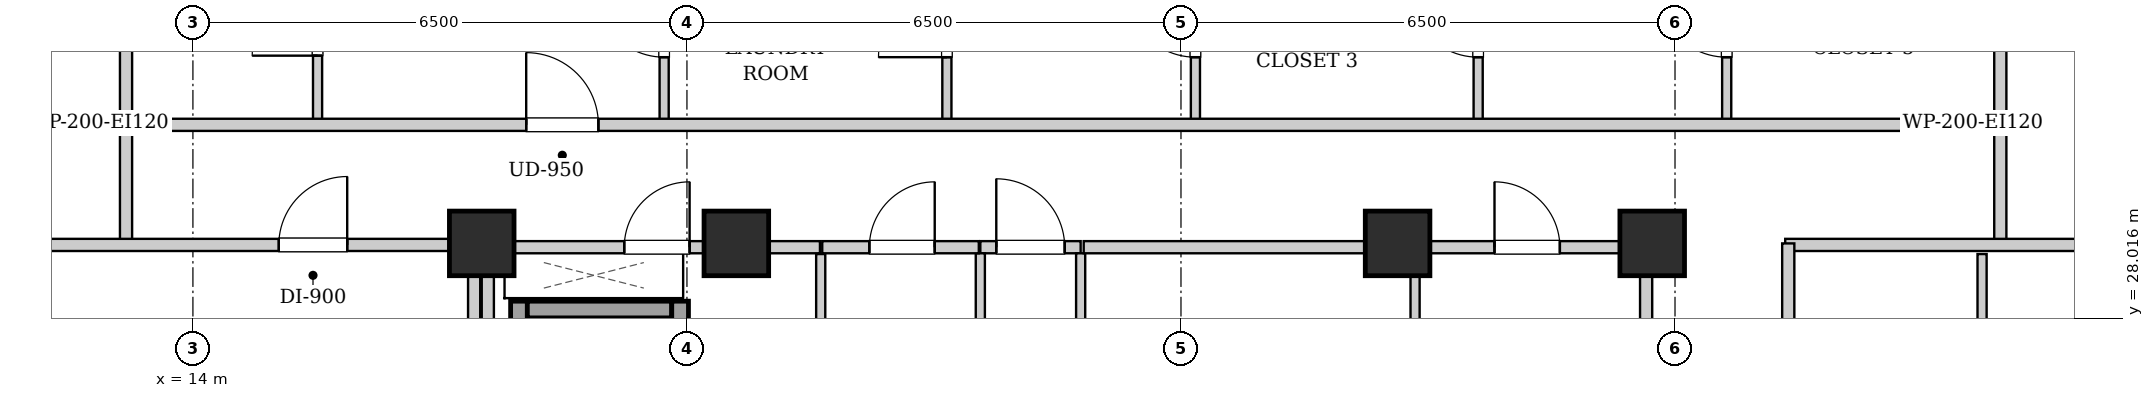
"""IFC4 building model, lengths in metres.
Left out: names, types, materials, properties, quantities, classifications, styles, units other than length and angle.
Written with IfcOpenShell. Run it as: python <this file> out.ifc"""

import sys

from ifc_helpers import new_model, si_unit, direction, frame, frame_2d, origin, origin_2d, place, context, subcontext, project, spatial, rectangle, extrude, element, fill, save


model = new_model("IFC4")
c1 = context("Model", 3, precision=1e-05, world=origin(), true_north=direction((0.0, 1.0)))
c2 = subcontext(c1, "Body", "Model", "MODEL_VIEW")
j1 = project(units=[si_unit("LENGTHUNIT", "METRE"), si_unit("PLANEANGLEUNIT", "RADIAN")], contexts=[c1])
p1 = place(None, origin())
s1 = spatial("IfcSite", under=j1, at=p1, CompositionType="ELEMENT")
p2 = place(p1, origin())
s2 = spatial("IfcBuilding", under=s1, at=p2, CompositionType="ELEMENT")
p3 = place(p2, frame((0.0, 0.0, 184.3)))
s3 = spatial("IfcBuildingStorey", under=s2, at=p3, CompositionType="ELEMENT", Elevation=184.3)
for number, where, z_axis, x_axis in (
    (1, (17.8, 29.0, 0.0), (0.0, 0.0, 1.0), (1.0, 0.0, 0.0)),
    (2, (21.15, 29.0, 0.0), (0.0, 0.0, 1.0), (1.0, 0.0, 0.0)),
    (3, (29.85, 29.0, 0.0), (0.0, 0.0, 1.0), (1.0, 0.0, 0.0)),
    (4, (33.2, 29.0, 0.0), (0.0, 0.0, 1.0), (1.0, 0.0, 0.0)),
):
    element("IfcColumn", number, at=place(p3, frame(where, z_axis=z_axis, x_axis=x_axis)), inside=s3, PredefinedType="COLUMN", context=c2, shape_type="SweptSolid", body=[
        extrude(rectangle(XDim=0.85, YDim=0.85, at=origin_2d()), origin(), (0.0, 0.0, 1.0), 3.3),
    ])
p4 = place(p3, frame((18.29, 24.1, 0.0), z_axis=(0.0, 0.0, 1.0), x_axis=(0.0, 1.0, 0.0)))
e5 = element("IfcWall", 5, at=p4, inside=s3, PredefinedType="SHEAR", context=c2, shape_type="SweptSolid", body=[
    extrude(rectangle(XDim=4.14, YDim=0.22, at=frame_2d((2.07, 0.0))), origin(), (0.0, 0.0, 1.0), 3.04),
])
p5 = place(p3, frame((18.4, 28.13, 0.0), z_axis=(0.0, 0.0, 1.0), x_axis=(1.0, 0.0, 0.0)))
e6 = element("IfcWall", 6, at=p5, inside=s3, PredefinedType="SHEAR", context=c2, shape_type="SweptSolid", body=[
    extrude(rectangle(XDim=1.9, YDim=0.22, at=frame_2d((0.95, 0.0))), origin(), (0.0, 0.0, 1.0), 3.04),
])
p6 = place(p3, frame((20.41, 26.06, 0.0), z_axis=(0.0, 0.0, 1.0), x_axis=(0.0, 1.0, 0.0)))
e7 = element("IfcWall", 7, at=p6, inside=s3, PredefinedType="SHEAR", context=c2, shape_type="SweptSolid", body=[
    extrude(rectangle(XDim=2.18, YDim=0.22, at=frame_2d((1.09, 0.0))), origin(), (0.0, 0.0, 1.0), 3.04),
])
p7 = place(p6, frame((0.54, 0.0, 0.0)))
e8 = element("IfcOpeningElement", 8, at=p7, cuts=e7, PredefinedType="OPENING", context=c2, shape_type="SweptSolid", body=[
    extrude(rectangle(XDim=1.1, YDim=2.15, at=frame_2d((0.55, 1.075))), frame((0.0, 0.12, 0.0), z_axis=(0.0, -1.0, 0.0), x_axis=(1.0, 0.0, 0.0)), (0.0, 0.0, 1.0), 0.24),
])
for number, where, z_axis, x_axis in (
    (9, (17.88, 24.12, 0.0), (0.0, 0.0, 1.0), (0.0, 1.0, 0.0)),
    (10, (33.12, 24.12, 0.0), (0.0, 0.0, 1.0), (0.0, 1.0, 0.0)),
):
    element("IfcWall", number, at=place(p3, frame(where, z_axis=z_axis, x_axis=x_axis)), inside=s3, PredefinedType="PARTITIONING", context=c2, shape_type="SweptSolid", body=[
        extrude(rectangle(XDim=4.76, YDim=0.16, at=frame_2d((2.38, 0.0))), origin(), (0.0, 0.0, 1.0), 3.04),
    ])
p8 = place(p3, frame((24.36, 28.95, 0.0), z_axis=(0.0, 0.0, 1.0), x_axis=(1.0, 0.0, 0.0)))
e11 = element("IfcWall", 11, at=p8, inside=s3, PredefinedType="PARTITIONING", context=c2, shape_type="SweptSolid", body=[
    extrude(rectangle(XDim=1.32, YDim=0.16, at=frame_2d((0.66, 0.0))), origin(), (0.0, 0.0, 1.0), 2.556),
])
p9 = place(p8, frame((0.21, 0.0, 0.0)))
e12 = element("IfcOpeningElement", 12, at=p9, cuts=e11, PredefinedType="OPENING", context=c2, shape_type="SweptSolid", body=[
    extrude(rectangle(XDim=0.9, YDim=2.05, at=frame_2d((0.45, 1.025))), frame((0.0, 0.09, 0.0), z_axis=(0.0, -1.0, 0.0), x_axis=(1.0, 0.0, 0.0)), (0.0, 0.0, 1.0), 0.18),
])
p10 = place(p3, frame((17.96, 28.95, 0.0), z_axis=(0.0, 0.0, 1.0), x_axis=(1.0, 0.0, 0.0)))
e13 = element("IfcWall", 13, at=p10, inside=s3, PredefinedType="PARTITIONING", context=c2, shape_type="SweptSolid", body=[
    extrude(rectangle(XDim=4.29, YDim=0.16, at=frame_2d((2.145, 0.0))), origin(), (0.0, 0.0, 1.0), 2.556),
])
p11 = place(p10, frame((1.715, 0.0, 0.0)))
e14 = element("IfcOpeningElement", 14, at=p11, cuts=e13, PredefinedType="OPENING", context=c2, shape_type="SweptSolid", body=[
    extrude(rectangle(XDim=0.86, YDim=2.05, at=frame_2d((0.43, 1.025))), frame((0.0, 0.09, 0.0), z_axis=(0.0, -1.0, 0.0), x_axis=(1.0, 0.0, 0.0)), (0.0, 0.0, 1.0), 0.18),
])
for number, where, z_axis, x_axis in (
    (15, (24.36, 25.0, 0.0), (0.0, 0.0, 1.0), (0.0, 1.0, 0.0)),
    (16, (25.68, 25.0, 0.0), (0.0, 0.0, 1.0), (0.0, 1.0, 0.0)),
):
    element("IfcWall", number, at=place(p3, frame(where, z_axis=z_axis, x_axis=x_axis)), inside=s3, PredefinedType="PARTITIONING", context=c2, shape_type="SweptSolid", body=[
        extrude(rectangle(XDim=3.87, YDim=0.12, at=frame_2d((1.935, 0.0))), origin(), (0.0, 0.0, 1.0), 3.04),
    ])
p12 = place(p3, frame((30.08, 26.18, 0.0), z_axis=(0.0, 0.0, 1.0), x_axis=(0.0, 1.0, 0.0)))
e17 = element("IfcWall", 17, at=p12, inside=s3, PredefinedType="PARTITIONING", context=c2, shape_type="SweptSolid", body=[
    extrude(rectangle(XDim=2.68, YDim=0.12, at=frame_2d((1.34, 0.0))), origin(), (0.0, 0.0, 1.0), 3.04),
])
p13 = place(p3, frame((30.08, 28.95, 0.0), z_axis=(0.0, 0.0, 1.0), x_axis=(1.0, 0.0, 0.0)))
e18 = element("IfcWall", 18, at=p13, inside=s3, PredefinedType="PARTITIONING", context=c2, shape_type="SweptSolid", body=[
    extrude(rectangle(XDim=2.96, YDim=0.16, at=frame_2d((1.48, 0.0))), origin(), (0.0, 0.0, 1.0), 3.04),
])
p14 = place(p13, frame((1.045, 0.0, 0.0)))
e19 = element("IfcOpeningElement", 19, at=p14, cuts=e18, PredefinedType="OPENING", context=c2, shape_type="SweptSolid", body=[
    extrude(rectangle(XDim=0.86, YDim=2.05, at=frame_2d((0.43, 1.025))), frame((0.0, 0.09, 0.0), z_axis=(0.0, -1.0, 0.0), x_axis=(1.0, 0.0, 0.0)), (0.0, 0.0, 1.0), 0.18),
])
p15 = place(p3, frame((22.26, 25.0, 0.0), z_axis=(0.0, 0.0, 1.0), x_axis=(0.0, 1.0, 0.0)))
e20 = element("IfcWall", 20, at=p15, inside=s3, PredefinedType="PARTITIONING", context=c2, shape_type="SweptSolid", body=[
    extrude(rectangle(XDim=3.86, YDim=0.12, at=frame_2d((1.93, 0.0))), origin(), (0.0, 0.0, 1.0), 3.04),
])
p16 = place(p3, frame((22.28, 28.95, 0.0), z_axis=(0.0, 0.0, 1.0), x_axis=(1.0, 0.0, 0.0)))
e21 = element("IfcWall", 21, at=p16, inside=s3, PredefinedType="PARTITIONING", context=c2, shape_type="SweptSolid", body=[
    extrude(rectangle(XDim=2.06, YDim=0.16, at=frame_2d((1.03, 0.0))), origin(), (0.0, 0.0, 1.0), 2.556),
])
p17 = place(p16, frame((0.62, 0.0, 0.0)))
e22 = element("IfcOpeningElement", 22, at=p17, cuts=e21, PredefinedType="OPENING", context=c2, shape_type="SweptSolid", body=[
    extrude(rectangle(XDim=0.86, YDim=2.05, at=frame_2d((0.43, 1.025))), frame((0.0, 0.09, 0.0), z_axis=(0.0, -1.0, 0.0), x_axis=(1.0, 0.0, 0.0)), (0.0, 0.0, 1.0), 0.18),
])
p18 = place(p3, frame((25.72, 28.95, 0.0), z_axis=(0.0, 0.0, 1.0), x_axis=(1.0, 0.0, 0.0)))
e23 = element("IfcWall", 23, at=p18, inside=s3, PredefinedType="PARTITIONING", context=c2, shape_type="SweptSolid", body=[
    extrude(rectangle(XDim=4.32, YDim=0.16, at=frame_2d((2.16, 0.0))), origin(), (0.0, 0.0, 1.0), 2.556),
])
for number, where, z_axis, x_axis in (
    (24, (13.12, 28.98, 0.0), (0.0, 0.0, 1.0), (0.0, 1.0, 0.0)),
    (25, (37.78, 28.98, 0.0), (0.0, 0.0, 1.0), (0.0, 1.0, 0.0)),
):
    element("IfcWall", number, at=place(p3, frame(where, z_axis=z_axis, x_axis=x_axis)), inside=s3, PredefinedType="PARTITIONING", context=c2, shape_type="SweptSolid", body=[
        extrude(rectangle(XDim=1.58, YDim=0.16, at=frame_2d((0.79, 0.0))), origin(), (0.0, 0.0, 1.0), 3.04),
    ])
p19 = place(p3, frame((10.88, 28.98, 0.0), z_axis=(0.0, 0.0, 1.0), x_axis=(1.0, 0.0, 0.0)))
e26 = element("IfcWall", 26, at=p19, inside=s3, PredefinedType="PARTITIONING", context=c2, shape_type="SweptSolid", body=[
    extrude(rectangle(XDim=6.88, YDim=0.16, at=frame_2d((3.44, 0.0))), origin(), (0.0, 0.0, 1.0), 2.556),
])
p20 = place(p19, frame((4.25, 0.0, 0.0)))
e27 = element("IfcOpeningElement", 27, at=p20, cuts=e26, PredefinedType="OPENING", context=c2, shape_type="SweptSolid", body=[
    extrude(rectangle(XDim=0.9, YDim=2.05, at=frame_2d((0.45, 1.025))), frame((0.0, 0.09, 0.0), z_axis=(0.0, -1.0, 0.0), x_axis=(1.0, 0.0, 0.0)), (0.0, 0.0, 1.0), 0.18),
])
p21 = place(p3, frame((34.95, 28.98, 0.0), z_axis=(0.0, 0.0, 1.0), x_axis=(1.0, 0.0, 0.0)))
e28 = element("IfcWall", 28, at=p21, inside=s3, PredefinedType="PARTITIONING", context=c2, shape_type="SweptSolid", body=[
    extrude(rectangle(XDim=5.07, YDim=0.16, at=frame_2d((2.535, 0.0))), origin(), (0.0, 0.0, 1.0), 2.556),
])
for number, where, z_axis, x_axis in (
    (29, (13.12, 30.6, 0.0), (0.0, 0.0, 1.0), (0.0, 1.0, 0.0)),
    (30, (37.78, 30.6, 0.0), (0.0, 0.0, 1.0), (0.0, 1.0, 0.0)),
):
    element("IfcWall", number, at=place(p3, frame(where, z_axis=z_axis, x_axis=x_axis)), inside=s3, PredefinedType="PARTITIONING", context=c2, shape_type="SweptSolid", body=[
        extrude(rectangle(XDim=2.66, YDim=0.16, at=frame_2d((1.33, 0.0))), origin(), (0.0, 0.0, 1.0), 3.04),
    ])
p22 = place(p3, frame((15.64, 30.6, 0.0), z_axis=(0.0, 0.0, 1.0), x_axis=(0.0, 1.0, 0.0)))
e31 = element("IfcWall", 31, at=p22, inside=s3, PredefinedType="PARTITIONING", context=c2, shape_type="SweptSolid", body=[
    extrude(rectangle(XDim=2.6, YDim=0.12, at=frame_2d((1.3, 0.0))), origin(), (0.0, 0.0, 1.0), 3.04),
])
p23 = place(p22, frame((0.87, 0.0, 0.0)))
e32 = element("IfcOpeningElement", 32, at=p23, cuts=e31, PredefinedType="OPENING", context=c2, shape_type="SweptSolid", body=[
    extrude(rectangle(XDim=0.86, YDim=2.05, at=frame_2d((0.43, 1.025))), frame((0.0, 0.07, 0.0), z_axis=(0.0, -1.0, 0.0), x_axis=(1.0, 0.0, 0.0)), (0.0, 0.0, 1.0), 0.14),
])
p24 = place(p3, frame((20.2, 30.6, 0.0), z_axis=(0.0, 0.0, 1.0), x_axis=(0.0, 1.0, 0.0)))
e33 = element("IfcWall", 33, at=p24, inside=s3, PredefinedType="PARTITIONING", context=c2, shape_type="SweptSolid", body=[
    extrude(rectangle(XDim=2.6, YDim=0.12, at=frame_2d((1.3, 0.0))), origin(), (0.0, 0.0, 1.0), 3.04),
])
p25 = place(p24, frame((0.85, 0.0, 0.0)))
e34 = element("IfcOpeningElement", 34, at=p25, cuts=e33, PredefinedType="OPENING", context=c2, shape_type="SweptSolid", body=[
    extrude(rectangle(XDim=0.9, YDim=2.05, at=frame_2d((0.45, 1.025))), frame((0.0, 0.07, 0.0), z_axis=(0.0, -1.0, 0.0), x_axis=(1.0, 0.0, 0.0)), (0.0, 0.0, 1.0), 0.14),
])
p26 = place(p3, frame((23.92, 30.6, 0.0), z_axis=(0.0, 0.0, 1.0), x_axis=(0.0, 1.0, 0.0)))
e35 = element("IfcWall", 35, at=p26, inside=s3, PredefinedType="PARTITIONING", context=c2, shape_type="SweptSolid", body=[
    extrude(rectangle(XDim=2.6, YDim=0.12, at=frame_2d((1.3, 0.0))), origin(), (0.0, 0.0, 1.0), 3.04),
])
p27 = place(p26, frame((0.85, 0.0, 0.0)))
e36 = element("IfcOpeningElement", 36, at=p27, cuts=e35, PredefinedType="OPENING", context=c2, shape_type="SweptSolid", body=[
    extrude(rectangle(XDim=0.9, YDim=2.05, at=frame_2d((0.45, 1.025))), frame((0.0, 0.07, 0.0), z_axis=(0.0, -1.0, 0.0), x_axis=(1.0, 0.0, 0.0)), (0.0, 0.0, 1.0), 0.14),
])
p28 = place(p3, frame((27.19, 30.6, 0.0), z_axis=(0.0, 0.0, 1.0), x_axis=(0.0, 1.0, 0.0)))
e37 = element("IfcWall", 37, at=p28, inside=s3, PredefinedType="PARTITIONING", context=c2, shape_type="SweptSolid", body=[
    extrude(rectangle(XDim=2.6, YDim=0.12, at=frame_2d((1.3, 0.0))), origin(), (0.0, 0.0, 1.0), 3.04),
])
p29 = place(p28, frame((0.85, 0.0, 0.0)))
e38 = element("IfcOpeningElement", 38, at=p29, cuts=e37, PredefinedType="OPENING", context=c2, shape_type="SweptSolid", body=[
    extrude(rectangle(XDim=0.9, YDim=2.05, at=frame_2d((0.45, 1.025))), frame((0.0, 0.07, 0.0), z_axis=(0.0, -1.0, 0.0), x_axis=(1.0, 0.0, 0.0)), (0.0, 0.0, 1.0), 0.14),
])
p30 = place(p3, frame((30.91, 30.6, 0.0), z_axis=(0.0, 0.0, 1.0), x_axis=(0.0, 1.0, 0.0)))
e39 = element("IfcWall", 39, at=p30, inside=s3, PredefinedType="PARTITIONING", context=c2, shape_type="SweptSolid", body=[
    extrude(rectangle(XDim=2.6, YDim=0.12, at=frame_2d((1.3, 0.0))), origin(), (0.0, 0.0, 1.0), 3.04),
])
p31 = place(p30, frame((0.85, 0.0, 0.0)))
e40 = element("IfcOpeningElement", 40, at=p31, cuts=e39, PredefinedType="OPENING", context=c2, shape_type="SweptSolid", body=[
    extrude(rectangle(XDim=0.9, YDim=2.05, at=frame_2d((0.45, 1.025))), frame((0.0, 0.07, 0.0), z_axis=(0.0, -1.0, 0.0), x_axis=(1.0, 0.0, 0.0)), (0.0, 0.0, 1.0), 0.14),
])
p32 = place(p3, frame((34.18, 30.6, 0.0), z_axis=(0.0, 0.0, 1.0), x_axis=(0.0, 1.0, 0.0)))
e41 = element("IfcWall", 41, at=p32, inside=s3, PredefinedType="PARTITIONING", context=c2, shape_type="SweptSolid", body=[
    extrude(rectangle(XDim=2.6, YDim=0.12, at=frame_2d((1.3, 0.0))), origin(), (0.0, 0.0, 1.0), 3.04),
])
p33 = place(p32, frame((0.85, 0.0, 0.0)))
e42 = element("IfcOpeningElement", 42, at=p33, cuts=e41, PredefinedType="OPENING", context=c2, shape_type="SweptSolid", body=[
    extrude(rectangle(XDim=0.9, YDim=2.05, at=frame_2d((0.45, 1.025))), frame((0.0, 0.07, 0.0), z_axis=(0.0, -1.0, 0.0), x_axis=(1.0, 0.0, 0.0)), (0.0, 0.0, 1.0), 0.14),
])
p34 = place(p3, frame((37.54, 24.552, 0.0), z_axis=(0.0, 0.0, 1.0), x_axis=(0.0, 1.0, 0.0)))
e43 = element("IfcWall", 43, at=p34, inside=s3, PredefinedType="PARTITIONING", context=c2, shape_type="SweptSolid", body=[
    extrude(rectangle(XDim=4.308, YDim=0.12, at=frame_2d((2.154, 0.0))), origin(), (0.0, 0.0, 1.0), 3.04),
])
p35 = place(p34, frame((1.704, 0.0, 0.0)))
e44 = element("IfcOpeningElement", 44, at=p35, cuts=e43, PredefinedType="OPENING", context=c2, shape_type="SweptSolid", body=[
    extrude(rectangle(XDim=0.9, YDim=2.05, at=frame_2d((0.45, 1.025))), frame((0.0, 0.07, 0.0), z_axis=(0.0, -1.0, 0.0), x_axis=(1.0, 0.0, 0.0)), (0.0, 0.0, 1.0), 0.14),
])
p36 = place(p3, frame((13.15, 30.56, 0.0), z_axis=(0.0, 0.0, 1.0), x_axis=(1.0, 0.0, 0.0)))
e45 = element("IfcWall", 45, at=p36, inside=s3, PredefinedType="PARTITIONING", context=c2, shape_type="SweptSolid", body=[
    extrude(rectangle(XDim=24.6, YDim=0.16, at=frame_2d((12.3, 0.0))), origin(), (0.0, 0.0, 1.0), 3.04),
])
p37 = place(p36, frame((5.235, 0.0, 0.0)))
e46 = element("IfcOpeningElement", 46, at=p37, cuts=e45, PredefinedType="OPENING", context=c2, shape_type="SweptSolid", body=[
    extrude(rectangle(XDim=0.95, YDim=2.1, at=frame_2d((0.475, 1.05))), frame((0.0, 0.09, 0.0), z_axis=(0.0, -1.0, 0.0), x_axis=(1.0, 0.0, 0.0)), (0.0, 0.0, 1.0), 0.18),
])
p38 = place(p3, frame((17.7, 15.02, 0.0), z_axis=(0.0, 0.0, 1.0), x_axis=(0.0, 1.0, 0.0)))
e47 = element("IfcWall", 47, at=p38, inside=s3, PredefinedType="PARTITIONING", context=c2, shape_type="SweptSolid", body=[
    extrude(rectangle(XDim=13.98, YDim=0.16, at=frame_2d((6.99, 0.0))), origin(), (0.0, 0.0, 1.0), 3.04),
])
p39 = place(p3, frame((34.99, 15.07, 0.0), z_axis=(0.0, 0.0, 1.0), x_axis=(0.0, 1.0, 0.0)))
e48 = element("IfcWall", 48, at=p39, inside=s3, PredefinedType="PARTITIONING", context=c2, shape_type="SweptSolid", body=[
    extrude(rectangle(XDim=13.93, YDim=0.16, at=frame_2d((6.965, 0.0))), origin(), (0.0, 0.0, 1.0), 3.04),
])
p40 = place(p39, frame((4.385, 0.0, 0.0)))
e49 = element("IfcOpeningElement", 49, at=p40, cuts=e48, PredefinedType="OPENING", context=c2, shape_type="SweptSolid", body=[
    extrude(rectangle(XDim=0.95, YDim=2.1, at=frame_2d((0.475, 1.05))), frame((0.0, 0.09, 0.0), z_axis=(0.0, -1.0, 0.0), x_axis=(1.0, 0.0, 0.0)), (0.0, 0.0, 1.0), 0.18),
])
p41 = place(p9, origin())
e50 = element("IfcDoor", 50, at=p41, inside=s3, OperationType="SINGLE_SWING_LEFT", PredefinedType="DOOR", context=c2, shape_type="SweptSolid", body=[
    extrude(rectangle(XDim=0.9, YDim=2.05, at=frame_2d((0.45, 1.025))), frame((0.0, 0.025, 0.0), z_axis=(0.0, -1.0, 0.0), x_axis=(1.0, 0.0, 0.0)), (0.0, 0.0, 1.0), 0.05),
])
fill(e12, e50)
p42 = place(p11, origin())
e51 = element("IfcDoor", 51, at=p42, inside=s3, OperationType="SINGLE_SWING_RIGHT", PredefinedType="DOOR", context=c2, shape_type="SweptSolid", body=[
    extrude(rectangle(XDim=0.86, YDim=2.05, at=frame_2d((0.43, 1.025))), frame((0.0, 0.025, 0.0), z_axis=(0.0, -1.0, 0.0), x_axis=(1.0, 0.0, 0.0)), (0.0, 0.0, 1.0), 0.05),
])
fill(e14, e51)
p43 = place(p14, origin())
e52 = element("IfcDoor", 52, at=p43, inside=s3, OperationType="SINGLE_SWING_LEFT", PredefinedType="DOOR", context=c2, shape_type="SweptSolid", body=[
    extrude(rectangle(XDim=0.86, YDim=2.05, at=frame_2d((0.43, 1.025))), frame((0.0, 0.025, 0.0), z_axis=(0.0, -1.0, 0.0), x_axis=(1.0, 0.0, 0.0)), (0.0, 0.0, 1.0), 0.05),
])
fill(e19, e52)
p44 = place(p17, origin())
e53 = element("IfcDoor", 53, at=p44, inside=s3, OperationType="SINGLE_SWING_RIGHT", PredefinedType="DOOR", context=c2, shape_type="SweptSolid", body=[
    extrude(rectangle(XDim=0.86, YDim=2.05, at=frame_2d((0.43, 1.025))), frame((0.0, 0.025, 0.0), z_axis=(0.0, -1.0, 0.0), x_axis=(1.0, 0.0, 0.0)), (0.0, 0.0, 1.0), 0.05),
])
fill(e22, e53)
p45 = place(p20, origin())
e54 = element("IfcDoor", 54, at=p45, inside=s3, OperationType="SINGLE_SWING_RIGHT", PredefinedType="DOOR", context=c2, shape_type="SweptSolid", body=[
    extrude(rectangle(XDim=0.9, YDim=2.05, at=frame_2d((0.45, 1.025))), frame((0.0, 0.025, 0.0), z_axis=(0.0, -1.0, 0.0), x_axis=(1.0, 0.0, 0.0)), (0.0, 0.0, 1.0), 0.05),
])
fill(e27, e54)
p46 = place(p23, origin())
e55 = element("IfcDoor", 55, at=p46, inside=s3, OperationType="SINGLE_SWING_LEFT", PredefinedType="DOOR", context=c2, shape_type="SweptSolid", body=[
    extrude(rectangle(XDim=0.86, YDim=2.05, at=frame_2d((0.43, 1.025))), frame((0.0, 0.025, 0.0), z_axis=(0.0, -1.0, 0.0), x_axis=(1.0, 0.0, 0.0)), (0.0, 0.0, 1.0), 0.05),
])
fill(e32, e55)
p47 = place(p25, origin())
e56 = element("IfcDoor", 56, at=p47, inside=s3, OperationType="SINGLE_SWING_RIGHT", PredefinedType="DOOR", context=c2, shape_type="SweptSolid", body=[
    extrude(rectangle(XDim=0.9, YDim=2.05, at=frame_2d((0.45, 1.025))), frame((0.0, 0.025, 0.0), z_axis=(0.0, -1.0, 0.0), x_axis=(1.0, 0.0, 0.0)), (0.0, 0.0, 1.0), 0.05),
])
fill(e34, e56)
p48 = place(p27, origin())
e57 = element("IfcDoor", 57, at=p48, inside=s3, OperationType="SINGLE_SWING_LEFT", PredefinedType="DOOR", context=c2, shape_type="SweptSolid", body=[
    extrude(rectangle(XDim=0.9, YDim=2.05, at=frame_2d((0.45, 1.025))), frame((0.0, 0.025, 0.0), z_axis=(0.0, -1.0, 0.0), x_axis=(1.0, 0.0, 0.0)), (0.0, 0.0, 1.0), 0.05),
])
fill(e36, e57)
p49 = place(p29, origin())
e58 = element("IfcDoor", 58, at=p49, inside=s3, OperationType="SINGLE_SWING_RIGHT", PredefinedType="DOOR", context=c2, shape_type="SweptSolid", body=[
    extrude(rectangle(XDim=0.9, YDim=2.05, at=frame_2d((0.45, 1.025))), frame((0.0, 0.025, 0.0), z_axis=(0.0, -1.0, 0.0), x_axis=(1.0, 0.0, 0.0)), (0.0, 0.0, 1.0), 0.05),
])
fill(e38, e58)
p50 = place(p31, origin())
e59 = element("IfcDoor", 59, at=p50, inside=s3, OperationType="SINGLE_SWING_RIGHT", PredefinedType="DOOR", context=c2, shape_type="SweptSolid", body=[
    extrude(rectangle(XDim=0.9, YDim=2.05, at=frame_2d((0.45, 1.025))), frame((0.0, 0.025, 0.0), z_axis=(0.0, -1.0, 0.0), x_axis=(1.0, 0.0, 0.0)), (0.0, 0.0, 1.0), 0.05),
])
fill(e40, e59)
p51 = place(p33, origin())
e60 = element("IfcDoor", 60, at=p51, inside=s3, OperationType="SINGLE_SWING_RIGHT", PredefinedType="DOOR", context=c2, shape_type="SweptSolid", body=[
    extrude(rectangle(XDim=0.9, YDim=2.05, at=frame_2d((0.45, 1.025))), frame((0.0, 0.025, 0.0), z_axis=(0.0, -1.0, 0.0), x_axis=(1.0, 0.0, 0.0)), (0.0, 0.0, 1.0), 0.05),
])
fill(e42, e60)
p52 = place(p37, origin())
e61 = element("IfcDoor", 61, at=p52, inside=s3, OperationType="SINGLE_SWING_LEFT", PredefinedType="DOOR", context=c2, shape_type="SweptSolid", body=[
    extrude(rectangle(XDim=0.95, YDim=2.1, at=frame_2d((0.475, 1.05))), frame((0.0, 0.025, 0.0), z_axis=(0.0, -1.0, 0.0), x_axis=(1.0, 0.0, 0.0)), (0.0, 0.0, 1.0), 0.05),
])
fill(e46, e61)
save(model, sys.argv[1])
